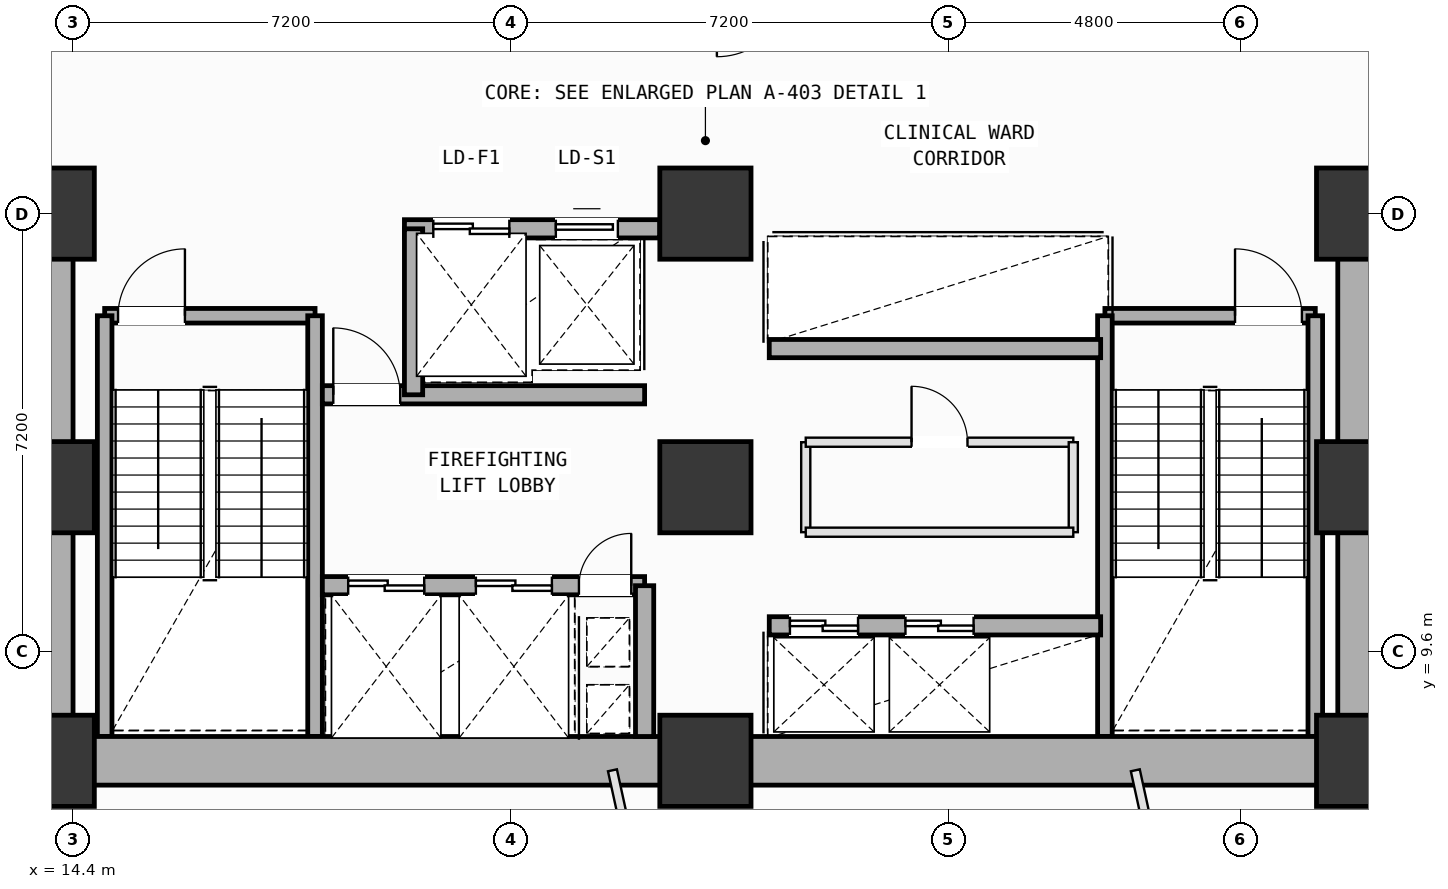
"""IFC4 building model, lengths in metres.
Left out: names, types, materials, properties, quantities, classifications, styles, units other than length and angle.
Written with IfcOpenShell. Run it as: python <this file> out.ifc"""

import sys

from ifc_helpers import new_model, si_unit, direction, frame, frame_2d, origin, origin_2d, place, context, subcontext, project, spatial, rectangle, extrude, element, fill, save


model = new_model("IFC4")
c1 = context("Model", 3, precision=1e-05, world=origin(), true_north=direction((0.0, 1.0)))
c2 = subcontext(c1, "Body", "Model", "MODEL_VIEW")
j1 = project(units=[si_unit("LENGTHUNIT", "METRE"), si_unit("PLANEANGLEUNIT", "RADIAN")], contexts=[c1])
p1 = place(None, origin())
s1 = spatial("IfcSite", under=j1, at=p1, CompositionType="ELEMENT")
p2 = place(p1, origin())
s2 = spatial("IfcBuilding", under=s1, at=p2, CompositionType="ELEMENT")
p3 = place(p2, frame((0.0, 0.0, 75.0)))
s3 = spatial("IfcBuildingStorey", under=s2, at=p3, CompositionType="ELEMENT", Elevation=75.0)
for number, where, z_axis, x_axis in (
    (1, (14.0, 7.8, 0.0), (0.0, 0.0, 1.0), (1.0, 0.0, 0.0)),
    (2, (14.0, 12.3, 0.0), (0.0, 0.0, 1.0), (1.0, 0.0, 0.0)),
    (3, (14.0, 16.8, 0.0), (0.0, 0.0, 1.0), (1.0, 0.0, 0.0)),
    (4, (24.8, 7.8, 0.0), (0.0, 0.0, 1.0), (1.0, 0.0, 0.0)),
    (5, (24.8, 12.3, 0.0), (0.0, 0.0, 1.0), (1.0, 0.0, 0.0)),
    (6, (24.8, 16.8, 0.0), (0.0, 0.0, 1.0), (1.0, 0.0, 0.0)),
    (7, (35.6, 7.8, 0.0), (0.0, 0.0, 1.0), (1.0, 0.0, 0.0)),
    (8, (35.6, 12.3, 0.0), (0.0, 0.0, 1.0), (1.0, 0.0, 0.0)),
    (9, (35.6, 16.8, 0.0), (0.0, 0.0, 1.0), (1.0, 0.0, 0.0)),
):
    element("IfcColumn", number, at=place(p3, frame(where, z_axis=z_axis, x_axis=x_axis)), inside=s3, PredefinedType="COLUMN", context=c2, shape_type="SweptSolid", body=[
        extrude(rectangle(XDim=1.5, YDim=1.5, at=origin_2d()), origin(), (0.0, 0.0, 1.0), 4.0),
    ])
p4 = place(p3, frame((14.92, 15.12, 0.0), z_axis=(0.0, 0.0, 1.0), x_axis=(1.0, 0.0, 0.0)))
e10 = element("IfcWall", 10, at=p4, inside=s3, PredefinedType="SOLIDWALL", context=c2, shape_type="SweptSolid", body=[
    extrude(rectangle(XDim=3.46, YDim=0.24, at=frame_2d((1.73, 0.0))), origin(), (0.0, 0.0, 1.0), 3.78),
])
p5 = place(p4, frame((0.22, 0.0, 0.0)))
e11 = element("IfcOpeningElement", 11, at=p5, cuts=e10, PredefinedType="OPENING", context=c2, shape_type="SweptSolid", body=[
    extrude(rectangle(XDim=1.1, YDim=2.15, at=frame_2d((0.55, 1.075))), frame((0.0, 0.13, 0.0), z_axis=(0.0, -1.0, 0.0), x_axis=(1.0, 0.0, 0.0)), (0.0, 0.0, 1.0), 0.26),
])
for number, where, z_axis, x_axis in (
    (12, (18.38, 15.12, 0.0), (0.0, 0.0, 1.0), (0.0, -1.0, 0.0)),
    (13, (14.92, 8.2, 0.0), (0.0, 0.0, 1.0), (0.0, 1.0, 0.0)),
):
    element("IfcWall", number, at=place(p3, frame(where, z_axis=z_axis, x_axis=x_axis)), inside=s3, PredefinedType="SOLIDWALL", context=c2, shape_type="SweptSolid", body=[
        extrude(rectangle(XDim=6.92, YDim=0.24, at=frame_2d((3.46, 0.0))), origin(), (0.0, 0.0, 1.0), 3.78),
    ])
p6 = place(p3, frame((31.37, 15.12, 0.0), z_axis=(0.0, 0.0, 1.0), x_axis=(1.0, 0.0, 0.0)))
e14 = element("IfcWall", 14, at=p6, inside=s3, PredefinedType="SOLIDWALL", context=c2, shape_type="SweptSolid", body=[
    extrude(rectangle(XDim=3.46, YDim=0.24, at=frame_2d((1.73, 0.0))), origin(), (0.0, 0.0, 1.0), 3.78),
])
p7 = place(p6, frame((2.14, 0.0, 0.0)))
e15 = element("IfcOpeningElement", 15, at=p7, cuts=e14, PredefinedType="OPENING", context=c2, shape_type="SweptSolid", body=[
    extrude(rectangle(XDim=1.1, YDim=2.15, at=frame_2d((0.55, 1.075))), frame((0.0, 0.13, 0.0), z_axis=(0.0, -1.0, 0.0), x_axis=(1.0, 0.0, 0.0)), (0.0, 0.0, 1.0), 0.26),
])
for number, where, z_axis, x_axis in (
    (16, (34.83, 15.12, 0.0), (0.0, 0.0, 1.0), (0.0, -1.0, 0.0)),
    (17, (31.37, 8.2, 0.0), (0.0, 0.0, 1.0), (0.0, 1.0, 0.0)),
):
    element("IfcWall", number, at=place(p3, frame(where, z_axis=z_axis, x_axis=x_axis)), inside=s3, PredefinedType="SOLIDWALL", context=c2, shape_type="SweptSolid", body=[
        extrude(rectangle(XDim=6.92, YDim=0.24, at=frame_2d((3.46, 0.0))), origin(), (0.0, 0.0, 1.0), 3.78),
    ])
for number, where, z_axis, x_axis in (
    (18, (14.0, 7.8, 0.0), (0.0, 0.0, 1.0), (1.0, 0.0, 0.0)),
    (19, (24.8, 7.8, 0.0), (0.0, 0.0, 1.0), (1.0, 0.0, 0.0)),
):
    element("IfcWall", number, at=place(p3, frame(where, z_axis=z_axis, x_axis=x_axis)), inside=s3, PredefinedType="SHEAR", context=c2, shape_type="SweptSolid", body=[
        extrude(rectangle(XDim=10.8, YDim=0.8, at=frame_2d((5.4, 0.0))), origin(), (0.0, 0.0, 1.0), 3.78),
    ])
for number, where, z_axis, x_axis in (
    (20, (35.6, 7.8, 0.0), (0.0, 0.0, 1.0), (0.0, 1.0, 0.0)),
    (21, (14.0, 16.8, 0.0), (0.0, 0.0, 1.0), (0.0, -1.0, 0.0)),
):
    element("IfcWall", number, at=place(p3, frame(where, z_axis=z_axis, x_axis=x_axis)), inside=s3, PredefinedType="SHEAR", context=c2, shape_type="SweptSolid", body=[
        extrude(rectangle(XDim=9.0, YDim=0.8, at=frame_2d((4.5, 0.0))), origin(), (0.0, 0.0, 1.0), 3.78),
    ])
p8 = place(p3, frame((19.85, 16.55, 0.0), z_axis=(0.0, 0.0, 1.0), x_axis=(1.0, 0.0, 0.0)))
e22 = element("IfcWall", 22, at=p8, inside=s3, PredefinedType="SOLIDWALL", context=c2, shape_type="SweptSolid", body=[
    extrude(rectangle(XDim=4.2, YDim=0.3, at=frame_2d((2.1, 0.0))), origin(), (0.0, 0.0, 1.0), 3.78),
])
p9 = place(p8, frame((0.475, 0.0, 0.0)))
e23 = element("IfcOpeningElement", 23, at=p9, cuts=e22, PredefinedType="OPENING", context=c2, shape_type="SweptSolid", body=[
    extrude(rectangle(XDim=1.25, YDim=2.18, at=frame_2d((0.625, 1.09))), frame((0.0, 0.16, 0.0), z_axis=(0.0, -1.0, 0.0), x_axis=(1.0, 0.0, 0.0)), (0.0, 0.0, 1.0), 0.32),
])
p10 = place(p8, frame((2.49, 0.0, 0.0)))
e24 = element("IfcOpeningElement", 24, at=p10, cuts=e22, PredefinedType="OPENING", context=c2, shape_type="SweptSolid", body=[
    extrude(rectangle(XDim=1.02, YDim=2.12, at=frame_2d((0.51, 1.06))), frame((0.0, 0.16, 0.0), z_axis=(0.0, -1.0, 0.0), x_axis=(1.0, 0.0, 0.0)), (0.0, 0.0, 1.0), 0.32),
])
p11 = place(p3, frame((18.5, 10.68, 0.0), z_axis=(0.0, 0.0, 1.0), x_axis=(1.0, 0.0, 0.0)))
e25 = element("IfcWall", 25, at=p11, inside=s3, PredefinedType="SOLIDWALL", context=c2, shape_type="SweptSolid", body=[
    extrude(rectangle(XDim=5.3, YDim=0.3, at=frame_2d((2.65, 0.0))), origin(), (0.0, 0.0, 1.0), 3.78),
])
p12 = place(p11, frame((4.22, 0.0, 0.0)))
e26 = element("IfcOpeningElement", 26, at=p12, cuts=e25, PredefinedType="OPENING", context=c2, shape_type="SweptSolid", body=[
    extrude(rectangle(XDim=0.86, YDim=2.06, at=frame_2d((0.43, 1.03))), frame((0.0, 0.16, 0.0), z_axis=(0.0, -1.0, 0.0), x_axis=(1.0, 0.0, 0.0)), (0.0, 0.0, 1.0), 0.32),
])
p13 = place(p11, frame((0.425, 0.0, 0.0)))
e27 = element("IfcOpeningElement", 27, at=p13, cuts=e25, PredefinedType="OPENING", context=c2, shape_type="SweptSolid", body=[
    extrude(rectangle(XDim=1.25, YDim=2.18, at=frame_2d((0.625, 1.09))), frame((0.0, 0.16, 0.0), z_axis=(0.0, -1.0, 0.0), x_axis=(1.0, 0.0, 0.0)), (0.0, 0.0, 1.0), 0.32),
])
p14 = place(p11, frame((2.525, 0.0, 0.0)))
e28 = element("IfcOpeningElement", 28, at=p14, cuts=e25, PredefinedType="OPENING", context=c2, shape_type="SweptSolid", body=[
    extrude(rectangle(XDim=1.25, YDim=2.18, at=frame_2d((0.625, 1.09))), frame((0.0, 0.16, 0.0), z_axis=(0.0, -1.0, 0.0), x_axis=(1.0, 0.0, 0.0)), (0.0, 0.0, 1.0), 0.32),
])
p15 = place(p3, frame((18.5, 13.82, 0.0), z_axis=(0.0, 0.0, 1.0), x_axis=(1.0, 0.0, 0.0)))
e29 = element("IfcWall", 29, at=p15, inside=s3, PredefinedType="SOLIDWALL", context=c2, shape_type="SweptSolid", body=[
    extrude(rectangle(XDim=5.3, YDim=0.3, at=frame_2d((2.65, 0.0))), origin(), (0.0, 0.0, 1.0), 3.78),
])
p16 = place(p15, frame((0.18, 0.0, 0.0)))
e30 = element("IfcOpeningElement", 30, at=p16, cuts=e29, PredefinedType="OPENING", context=c2, shape_type="SweptSolid", body=[
    extrude(rectangle(XDim=1.1, YDim=2.15, at=frame_2d((0.55, 1.075))), frame((0.0, 0.16, 0.0), z_axis=(0.0, -1.0, 0.0), x_axis=(1.0, 0.0, 0.0)), (0.0, 0.0, 1.0), 0.32),
])
p17 = place(p3, frame((23.8, 8.2, 0.0), z_axis=(0.0, 0.0, 1.0), x_axis=(0.0, 1.0, 0.0)))
e31 = element("IfcWall", 31, at=p17, inside=s3, PredefinedType="SOLIDWALL", context=c2, shape_type="SweptSolid", body=[
    extrude(rectangle(XDim=2.48, YDim=0.3, at=frame_2d((1.24, 0.0))), origin(), (0.0, 0.0, 1.0), 3.78),
])
p18 = place(p3, frame((20.0, 13.82, 0.0), z_axis=(0.0, 0.0, 1.0), x_axis=(0.0, 1.0, 0.0)))
e32 = element("IfcWall", 32, at=p18, inside=s3, PredefinedType="SOLIDWALL", context=c2, shape_type="SweptSolid", body=[
    extrude(rectangle(XDim=2.73, YDim=0.3, at=frame_2d((1.365, 0.0))), origin(), (0.0, 0.0, 1.0), 3.78),
])
p19 = place(p3, frame((25.85, 10.02, 0.0), z_axis=(0.0, 0.0, 1.0), x_axis=(1.0, 0.0, 0.0)))
e33 = element("IfcWall", 33, at=p19, inside=s3, PredefinedType="SOLIDWALL", context=c2, shape_type="SweptSolid", body=[
    extrude(rectangle(XDim=5.45, YDim=0.3, at=frame_2d((2.725, 0.0))), origin(), (0.0, 0.0, 1.0), 3.78),
])
p20 = place(p19, frame((0.34, 0.0, 0.0)))
e34 = element("IfcOpeningElement", 34, at=p20, cuts=e33, PredefinedType="OPENING", context=c2, shape_type="SweptSolid", body=[
    extrude(rectangle(XDim=1.12, YDim=2.15, at=frame_2d((0.56, 1.075))), frame((0.0, 0.16, 0.0), z_axis=(0.0, -1.0, 0.0), x_axis=(1.0, 0.0, 0.0)), (0.0, 0.0, 1.0), 0.32),
])
p21 = place(p19, frame((2.24, 0.0, 0.0)))
e35 = element("IfcOpeningElement", 35, at=p21, cuts=e33, PredefinedType="OPENING", context=c2, shape_type="SweptSolid", body=[
    extrude(rectangle(XDim=1.12, YDim=2.15, at=frame_2d((0.56, 1.075))), frame((0.0, 0.16, 0.0), z_axis=(0.0, -1.0, 0.0), x_axis=(1.0, 0.0, 0.0)), (0.0, 0.0, 1.0), 0.32),
])
p22 = place(p3, frame((25.85, 14.58, 0.0), z_axis=(0.0, 0.0, 1.0), x_axis=(1.0, 0.0, 0.0)))
e36 = element("IfcWall", 36, at=p22, inside=s3, PredefinedType="SOLIDWALL", context=c2, shape_type="SweptSolid", body=[
    extrude(rectangle(XDim=5.45, YDim=0.3, at=frame_2d((2.725, 0.0))), origin(), (0.0, 0.0, 1.0), 3.78),
])
p23 = place(p3, frame((26.45, 11.56, 0.0), z_axis=(0.0, 0.0, 1.0), x_axis=(0.0, 1.0, 0.0)))
e37 = element("IfcWall", 37, at=p23, inside=s3, PredefinedType="PARTITIONING", context=c2, shape_type="SweptSolid", body=[
    extrude(rectangle(XDim=1.48, YDim=0.15, at=frame_2d((0.74, 0.0))), origin(), (0.0, 0.0, 1.0), 3.78),
])
p24 = place(p3, frame((26.45, 13.04, 0.0), z_axis=(0.0, 0.0, 1.0), x_axis=(1.0, 0.0, 0.0)))
e38 = element("IfcWall", 38, at=p24, inside=s3, PredefinedType="PARTITIONING", context=c2, shape_type="SweptSolid", body=[
    extrude(rectangle(XDim=4.4, YDim=0.15, at=frame_2d((2.2, 0.0))), origin(), (0.0, 0.0, 1.0), 3.78),
])
p25 = place(p24, frame((1.74, 0.0, 0.0)))
e39 = element("IfcOpeningElement", 39, at=p25, cuts=e38, PredefinedType="OPENING", context=c2, shape_type="SweptSolid", body=[
    extrude(rectangle(XDim=0.92, YDim=2.1, at=frame_2d((0.46, 1.05))), frame((0.0, 0.085, 0.0), z_axis=(0.0, -1.0, 0.0), x_axis=(1.0, 0.0, 0.0)), (0.0, 0.0, 1.0), 0.17),
])
p26 = place(p3, frame((30.85, 13.04, 0.0), z_axis=(0.0, 0.0, 1.0), x_axis=(0.0, -1.0, 0.0)))
e40 = element("IfcWall", 40, at=p26, inside=s3, PredefinedType="PARTITIONING", context=c2, shape_type="SweptSolid", body=[
    extrude(rectangle(XDim=1.48, YDim=0.15, at=frame_2d((0.74, 0.0))), origin(), (0.0, 0.0, 1.0), 3.78),
])
p27 = place(p3, frame((30.85, 11.56, 0.0), z_axis=(0.0, 0.0, 1.0), x_axis=(-1.0, 0.0, 0.0)))
e41 = element("IfcWall", 41, at=p27, inside=s3, PredefinedType="PARTITIONING", context=c2, shape_type="SweptSolid", body=[
    extrude(rectangle(XDim=4.4, YDim=0.15, at=frame_2d((2.2, 0.0))), origin(), (0.0, 0.0, 1.0), 3.78),
])
p28 = place(p3, frame((23.271, 7.644, 0.0), z_axis=(0.0, 0.0, 1.0), x_axis=(0.213864339453, -0.976863370339, 0.0)))
e42 = element("IfcWall", 42, at=p28, inside=s3, PredefinedType="PARTITIONING", context=c2, shape_type="SweptSolid", body=[
    extrude(rectangle(XDim=7.565, YDim=0.15, at=frame_2d((3.783, 0.0))), origin(), (0.0, 0.0, 1.0), 3.78),
])
p29 = place(p28, frame((3.506, 0.0, 0.0)))
e43 = element("IfcOpeningElement", 43, at=p29, cuts=e42, PredefinedType="OPENING", context=c2, shape_type="SweptSolid", body=[
    extrude(rectangle(XDim=0.86, YDim=2.06, at=frame_2d((0.43, 1.03))), frame((0.0, 0.085, 0.0), z_axis=(0.0, -1.0, 0.0), x_axis=(1.0, 0.0, 0.0)), (0.0, 0.0, 1.0), 0.17),
])
p30 = place(p3, frame((31.87, 7.644, 0.0), z_axis=(0.0, 0.0, 1.0), x_axis=(0.213728666116, -0.97689306338, 0.0)))
e44 = element("IfcWall", 44, at=p30, inside=s3, PredefinedType="PARTITIONING", context=c2, shape_type="SweptSolid", body=[
    extrude(rectangle(XDim=5.726, YDim=0.15, at=frame_2d((2.863, 0.0))), origin(), (0.0, 0.0, 1.0), 3.78),
])
p31 = place(p30, frame((2.587, 0.0, 0.0)))
e45 = element("IfcOpeningElement", 45, at=p31, cuts=e44, PredefinedType="OPENING", context=c2, shape_type="SweptSolid", body=[
    extrude(rectangle(XDim=0.86, YDim=2.06, at=frame_2d((0.43, 1.03))), frame((0.0, 0.085, 0.0), z_axis=(0.0, -1.0, 0.0), x_axis=(1.0, 0.0, 0.0)), (0.0, 0.0, 1.0), 0.17),
])
p32 = place(p5, origin())
e46 = element("IfcDoor", 46, at=p32, inside=s3, OperationType="SINGLE_SWING_RIGHT", PredefinedType="DOOR", context=c2, shape_type="SweptSolid", body=[
    extrude(rectangle(XDim=1.1, YDim=2.15, at=frame_2d((0.55, 1.075))), frame((0.0, 0.025, 0.0), z_axis=(0.0, -1.0, 0.0), x_axis=(1.0, 0.0, 0.0)), (0.0, 0.0, 1.0), 0.05),
])
fill(e11, e46)
p33 = place(p7, origin())
e47 = element("IfcDoor", 47, at=p33, inside=s3, OperationType="SINGLE_SWING_LEFT", PredefinedType="DOOR", context=c2, shape_type="SweptSolid", body=[
    extrude(rectangle(XDim=1.1, YDim=2.15, at=frame_2d((0.55, 1.075))), frame((0.0, 0.025, 0.0), z_axis=(0.0, -1.0, 0.0), x_axis=(1.0, 0.0, 0.0)), (0.0, 0.0, 1.0), 0.05),
])
fill(e15, e47)
p34 = place(p12, origin())
e48 = element("IfcDoor", 48, at=p34, inside=s3, OperationType="SINGLE_SWING_RIGHT", PredefinedType="DOOR", context=c2, shape_type="SweptSolid", body=[
    extrude(rectangle(XDim=0.86, YDim=2.06, at=frame_2d((0.43, 1.03))), frame((0.0, 0.025, 0.0), z_axis=(0.0, -1.0, 0.0), x_axis=(1.0, 0.0, 0.0)), (0.0, 0.0, 1.0), 0.05),
])
fill(e26, e48)
p35 = place(p16, origin())
e49 = element("IfcDoor", 49, at=p35, inside=s3, OperationType="SINGLE_SWING_LEFT", PredefinedType="DOOR", context=c2, shape_type="SweptSolid", body=[
    extrude(rectangle(XDim=1.1, YDim=2.15, at=frame_2d((0.55, 1.075))), frame((0.0, 0.025, 0.0), z_axis=(0.0, -1.0, 0.0), x_axis=(1.0, 0.0, 0.0)), (0.0, 0.0, 1.0), 0.05),
])
fill(e30, e49)
p36 = place(p13, origin())
e50 = element("IfcDoor", 50, at=p36, inside=s3, OperationType="DOUBLE_DOOR_SLIDING", PredefinedType="DOOR", context=c2, shape_type="SweptSolid", body=[
    extrude(rectangle(XDim=1.25, YDim=2.18, at=frame_2d((0.625, 1.09))), frame((0.0, 0.025, 0.0), z_axis=(0.0, -1.0, 0.0), x_axis=(1.0, 0.0, 0.0)), (0.0, 0.0, 1.0), 0.05),
])
fill(e27, e50)
p37 = place(p14, origin())
e51 = element("IfcDoor", 51, at=p37, inside=s3, OperationType="DOUBLE_DOOR_SLIDING", PredefinedType="DOOR", context=c2, shape_type="SweptSolid", body=[
    extrude(rectangle(XDim=1.25, YDim=2.18, at=frame_2d((0.625, 1.09))), frame((0.0, 0.025, 0.0), z_axis=(0.0, -1.0, 0.0), x_axis=(1.0, 0.0, 0.0)), (0.0, 0.0, 1.0), 0.05),
])
fill(e28, e51)
p38 = place(p20, origin())
e52 = element("IfcDoor", 52, at=p38, inside=s3, OperationType="DOUBLE_DOOR_SLIDING", PredefinedType="DOOR", context=c2, shape_type="SweptSolid", body=[
    extrude(rectangle(XDim=1.12, YDim=2.15, at=frame_2d((0.56, 1.075))), frame((0.0, 0.025, 0.0), z_axis=(0.0, -1.0, 0.0), x_axis=(1.0, 0.0, 0.0)), (0.0, 0.0, 1.0), 0.05),
])
fill(e34, e52)
p39 = place(p21, origin())
e53 = element("IfcDoor", 53, at=p39, inside=s3, OperationType="DOUBLE_DOOR_SLIDING", PredefinedType="DOOR", context=c2, shape_type="SweptSolid", body=[
    extrude(rectangle(XDim=1.12, YDim=2.15, at=frame_2d((0.56, 1.075))), frame((0.0, 0.025, 0.0), z_axis=(0.0, -1.0, 0.0), x_axis=(1.0, 0.0, 0.0)), (0.0, 0.0, 1.0), 0.05),
])
fill(e35, e53)
p40 = place(p9, origin())
e54 = element("IfcDoor", 54, at=p40, inside=s3, OperationType="DOUBLE_DOOR_SLIDING", PredefinedType="DOOR", context=c2, shape_type="SweptSolid", body=[
    extrude(rectangle(XDim=1.25, YDim=2.18, at=frame_2d((0.625, 1.09))), frame((0.0, 0.025, 0.0), z_axis=(0.0, -1.0, 0.0), x_axis=(1.0, 0.0, 0.0)), (0.0, 0.0, 1.0), 0.05),
])
fill(e23, e54)
p41 = place(p10, origin())
e55 = element("IfcDoor", 55, at=p41, inside=s3, OperationType="SLIDING_TO_LEFT", PredefinedType="DOOR", context=c2, shape_type="SweptSolid", body=[
    extrude(rectangle(XDim=1.02, YDim=2.12, at=frame_2d((0.51, 1.06))), frame((0.0, 0.025, 0.0), z_axis=(0.0, -1.0, 0.0), x_axis=(1.0, 0.0, 0.0)), (0.0, 0.0, 1.0), 0.05),
])
fill(e24, e55)
p42 = place(p25, origin())
e56 = element("IfcDoor", 56, at=p42, inside=s3, OperationType="SINGLE_SWING_LEFT", PredefinedType="DOOR", context=c2, shape_type="SweptSolid", body=[
    extrude(rectangle(XDim=0.92, YDim=2.1, at=frame_2d((0.46, 1.05))), frame((0.0, 0.025, 0.0), z_axis=(0.0, -1.0, 0.0), x_axis=(1.0, 0.0, 0.0)), (0.0, 0.0, 1.0), 0.05),
])
fill(e39, e56)
save(model, sys.argv[1])
